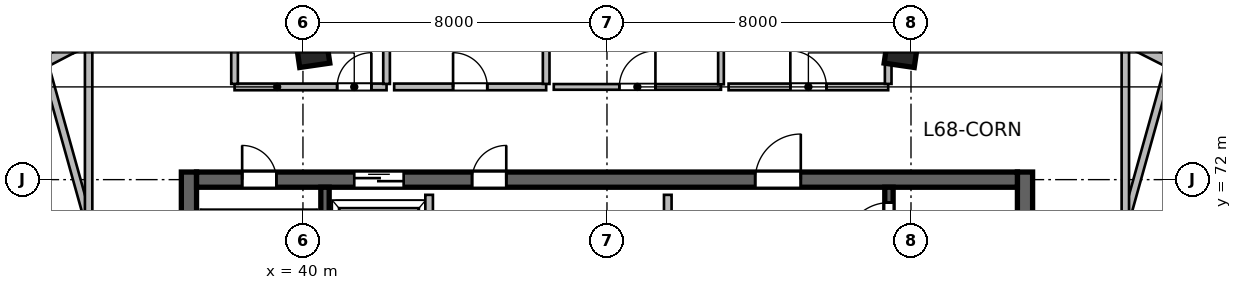
"""IFC4 building model, lengths in metres.
Left out: names, types, materials, properties, quantities, classifications, styles, units other than length and angle.
Written with IfcOpenShell. Run it as: python <this file> out.ifc"""

import sys

from ifc_helpers import new_model, si_unit, direction, frame, frame_2d, origin, origin_2d, place, context, subcontext, project, spatial, rectangle, extrude, source, transform, mapped, element, fill, save


model = new_model("IFC4")
c1 = context("Model", 3, precision=1e-05, world=origin(), true_north=direction((0.0, 1.0)))
c2 = subcontext(c1, "Body", "Model", "MODEL_VIEW")
j1 = project(units=[si_unit("LENGTHUNIT", "METRE"), si_unit("PLANEANGLEUNIT", "RADIAN")], contexts=[c1])
p1 = place(None, origin())
s1 = spatial("IfcSite", under=j1, at=p1, CompositionType="ELEMENT")
p2 = place(p1, origin())
s2 = spatial("IfcBuilding", under=s1, at=p2, CompositionType="ELEMENT")
p3 = place(p2, frame((0.0, 0.0, 279.6)))
s3 = spatial("IfcBuildingStorey", under=s2, at=p3, CompositionType="ELEMENT", Elevation=279.6)
m1 = source(origin(), c2, "Body", "SweptSolid", [
    extrude(rectangle(XDim=12.0, YDim=0.4, at=frame_2d((6.0, 0.0))), origin(), (0.0, 0.0, 1.0), 3.9),
])
for number, where, z_axis, x_axis in (
    (1, (37.0, 60.2, 0.0), (0.0, 0.0, 1.0), (0.0, 1.0, 0.0)),
    (2, (59.0, 60.2, 0.0), (0.0, 0.0, 1.0), (0.0, 1.0, 0.0)),
):
    element("IfcWall", number, at=place(p3, frame(where, z_axis=z_axis, x_axis=x_axis)), inside=s3, PredefinedType="SHEAR", context=c2, shape_type="MappedRepresentation", body=[
        mapped(m1, transform((0.0, 0.0, 0.0), scale=1.0)),
    ])
m2 = source(origin(), c2, "Body", "SweptSolid", [
    extrude(rectangle(XDim=21.6, YDim=0.4, at=frame_2d((10.8, 0.0))), origin(), (0.0, 0.0, 1.0), 3.9),
])
p4 = place(p3, frame((37.2, 72.0, 0.0), z_axis=(0.0, 0.0, 1.0), x_axis=(1.0, 0.0, 0.0)))
e3 = element("IfcWall", 3, at=p4, inside=s3, PredefinedType="SHEAR", context=c2, shape_type="MappedRepresentation", body=[
    mapped(m2, transform((0.0, 0.0, 0.0), scale=1.0)),
])
p5 = place(p4, frame((1.2, 0.0, 0.0)))
e4 = element("IfcOpeningElement", 4, at=p5, cuts=e3, PredefinedType="OPENING", context=c2, shape_type="SweptSolid", body=[
    extrude(rectangle(XDim=0.9, YDim=2.1, at=frame_2d((0.45, 1.05))), frame((0.0, 0.21, 0.0), z_axis=(0.0, -1.0, 0.0), x_axis=(1.0, 0.0, 0.0)), (0.0, 0.0, 1.0), 0.42),
])
p6 = place(p4, frame((14.7, 0.0, 0.0)))
e5 = element("IfcOpeningElement", 5, at=p6, cuts=e3, PredefinedType="OPENING", context=c2, shape_type="SweptSolid", body=[
    extrude(rectangle(XDim=1.2, YDim=2.15, at=frame_2d((0.6, 1.075))), frame((0.0, 0.21, 0.0), z_axis=(0.0, -1.0, 0.0), x_axis=(1.0, 0.0, 0.0)), (0.0, 0.0, 1.0), 0.42),
])
p7 = place(p4, frame((4.15, 0.0, 0.0)))
e6 = element("IfcOpeningElement", 6, at=p7, cuts=e3, PredefinedType="OPENING", context=c2, shape_type="SweptSolid", body=[
    extrude(rectangle(XDim=1.3, YDim=2.15, at=frame_2d((0.65, 1.075))), frame((0.0, 0.21, 0.0), z_axis=(0.0, -1.0, 0.0), x_axis=(1.0, 0.0, 0.0)), (0.0, 0.0, 1.0), 0.42),
])
p8 = place(p4, frame((7.25, 0.0, 0.0)))
e7 = element("IfcOpeningElement", 7, at=p8, cuts=e3, PredefinedType="OPENING", context=c2, shape_type="SweptSolid", body=[
    extrude(rectangle(XDim=0.9, YDim=2.1, at=frame_2d((0.45, 1.05))), frame((0.0, 0.21, 0.0), z_axis=(0.0, -1.0, 0.0), x_axis=(1.0, 0.0, 0.0)), (0.0, 0.0, 1.0), 0.42),
])
m3 = source(origin(), c2, "Body", "SweptSolid", [
    extrude(rectangle(XDim=11.2, YDim=0.22, at=frame_2d((5.6, 0.0))), origin(), (0.0, 0.0, 1.0), 3.9),
])
p9 = place(p3, frame((40.58, 60.6, 0.0), z_axis=(0.0, 0.0, 1.0), x_axis=(0.0, 1.0, 0.0)))
e8 = element("IfcWall", 8, at=p9, inside=s3, PredefinedType="SHEAR", context=c2, shape_type="MappedRepresentation", body=[
    mapped(m3, transform((0.0, 0.0, 0.0), scale=1.0)),
])
p10 = place(p3, frame((55.42, 60.6, 0.0), z_axis=(0.0, 0.0, 1.0), x_axis=(0.0, 1.0, 0.0)))
e9 = element("IfcWall", 9, at=p10, inside=s3, PredefinedType="SHEAR", context=c2, shape_type="MappedRepresentation", body=[
    mapped(m3, transform((0.0, 0.0, 0.0), scale=1.0)),
])
p11 = place(p10, frame((9.645, 0.0, 0.0)))
e10 = element("IfcOpeningElement", 10, at=p11, cuts=e9, PredefinedType="OPENING", context=c2, shape_type="SweptSolid", body=[
    extrude(rectangle(XDim=1.15, YDim=2.15, at=frame_2d((0.575, 1.075))), frame((0.0, 0.12, 0.0), z_axis=(0.0, -1.0, 0.0), x_axis=(1.0, 0.0, 0.0)), (0.0, 0.0, 1.0), 0.24),
])
m4 = source(origin(), c2, "Body", "SweptSolid", [
    extrude(rectangle(XDim=0.8, YDim=0.8, at=origin_2d()), origin(), (0.0, 0.0, 1.0), 3.9),
])
for number, where, z_axis, x_axis in (
    (11, (40.253, 75.404, 0.0), (0.0, 0.0, 1.0), (-0.143, 0.99, 0.0)),
    (12, (55.747, 75.404, 0.0), (0.0, 0.0, 1.0), (0.143, 0.99, 0.0)),
):
    element("IfcColumn", number, at=place(p3, frame(where, z_axis=z_axis, x_axis=x_axis)), inside=s3, PredefinedType="COLUMN", context=c2, shape_type="MappedRepresentation", body=[
        mapped(m4, transform((0.0, 0.0, 0.0), scale=1.0)),
    ])
m5 = source(origin(), c2, "Body", "SweptSolid", [
    extrude(rectangle(XDim=2.711, YDim=0.28, at=frame_2d((1.356, 0.0))), origin(), (0.0, 0.0, 1.0), 3.64),
])
p12 = place(p3, frame((31.502, 74.205, 0.0), z_axis=(0.0, 0.0, 1.0), x_axis=(0.886828760751, 0.462098202881, 0.0)))
e13 = element("IfcWall", 13, at=p12, inside=s3, PredefinedType="SOLIDWALL", context=c2, shape_type="MappedRepresentation", body=[
    mapped(m5, transform((0.0, 0.0, 0.0), scale=1.0)),
])
m6 = source(origin(), c2, "Body", "SweptSolid", [
    extrude(rectangle(XDim=2.673, YDim=0.28, at=frame_2d((1.337, 0.0))), origin(), (0.0, 0.0, 1.0), 3.64),
])
p13 = place(p3, frame((33.907, 75.458, 0.0), z_axis=(0.0, 0.0, 1.0), x_axis=(0.919036345912, 0.394172798266, 0.0)))
e14 = element("IfcWall", 14, at=p13, inside=s3, PredefinedType="SOLIDWALL", context=c2, shape_type="MappedRepresentation", body=[
    mapped(m6, transform((0.0, 0.0, 0.0), scale=1.0)),
])
m7 = source(origin(), c2, "Body", "SweptSolid", [
    extrude(rectangle(XDim=2.706, YDim=0.28, at=frame_2d((1.353, 0.0))), origin(), (0.0, 0.0, 1.0), 3.64),
])
p14 = place(p3, frame((61.745, 75.62, 0.0), z_axis=(0.0, 0.0, 1.0), x_axis=(0.891648836287, -0.452727680564, 0.0)))
e15 = element("IfcWall", 15, at=p14, inside=s3, PredefinedType="SOLIDWALL", context=c2, shape_type="MappedRepresentation", body=[
    mapped(m7, transform((0.0, 0.0, 0.0), scale=1.0)),
])
m8 = source(origin(), c2, "Body", "SweptSolid", [
    extrude(rectangle(XDim=5.8, YDim=0.2, at=frame_2d((2.9, 0.0))), origin(), (0.0, 0.0, 1.0), 3.64),
])
p15 = place(p3, frame((49.6, 65.8, 0.0), z_axis=(0.0, 0.0, 1.0), x_axis=(0.0, 1.0, 0.0)))
e16 = element("IfcWall", 16, at=p15, inside=s3, PredefinedType="SOLIDWALL", context=c2, shape_type="MappedRepresentation", body=[
    mapped(m8, transform((0.0, 0.0, 0.0), scale=1.0)),
])
m9 = source(origin(), c2, "Body", "SweptSolid", [
    extrude(rectangle(XDim=3.2, YDim=0.2, at=frame_2d((1.6, 0.0))), origin(), (0.0, 0.0, 1.0), 3.64),
])
p16 = place(p3, frame((43.32, 68.4, 0.0), z_axis=(0.0, 0.0, 1.0), x_axis=(0.0, 1.0, 0.0)))
e17 = element("IfcWall", 17, at=p16, inside=s3, PredefinedType="SOLIDWALL", context=c2, shape_type="MappedRepresentation", body=[
    mapped(m9, transform((0.0, 0.0, 0.0), scale=1.0)),
])
m10 = source(origin(), c2, "Body", "SweptSolid", [
    extrude(rectangle(XDim=4.0, YDim=0.175, at=frame_2d((2.0, 0.0))), origin(), (0.0, 0.0, 1.0), 3.64),
])
p17 = place(p3, frame((38.2, 74.44, 0.0), z_axis=(0.0, 0.0, 1.0), x_axis=(1.0, 0.0, 0.0)))
e18 = element("IfcWall", 18, at=p17, inside=s3, PredefinedType="PARTITIONING", context=c2, shape_type="MappedRepresentation", body=[
    mapped(m10, transform((0.0, 0.0, 0.0), scale=1.0)),
])
p18 = place(p17, frame((2.7, 0.0, 0.0)))
e19 = element("IfcOpeningElement", 19, at=p18, cuts=e18, PredefinedType="OPENING", context=c2, shape_type="SweptSolid", body=[
    extrude(rectangle(XDim=0.9, YDim=2.08, at=frame_2d((0.45, 1.04))), frame((0.0, 0.098, 0.0), z_axis=(0.0, -1.0, 0.0), x_axis=(1.0, 0.0, 0.0)), (0.0, 0.0, 1.0), 0.195),
])
m11 = source(origin(), c2, "Body", "SweptSolid", [
    extrude(rectangle(XDim=2.403, YDim=0.175, at=frame_2d((1.201, 0.0))), origin(), (0.0, 0.0, 1.0), 3.64),
])
for number, where, z_axis, x_axis in (
    (20, (38.2, 74.519, 0.0), (0.0, 0.0, 1.0), (0.0, 1.0, 0.0)),
    (21, (42.2, 74.519, 0.0), (0.0, 0.0, 1.0), (0.0, 1.0, 0.0)),
):
    element("IfcWall", number, at=place(p3, frame(where, z_axis=z_axis, x_axis=x_axis)), inside=s3, PredefinedType="PARTITIONING", context=c2, shape_type="MappedRepresentation", body=[
        mapped(m11, transform((0.0, 0.0, 0.0), scale=1.0)),
    ])
p19 = place(p3, frame((42.4, 74.44, 0.0), z_axis=(0.0, 0.0, 1.0), x_axis=(1.0, 0.0, 0.0)))
e22 = element("IfcWall", 22, at=p19, inside=s3, PredefinedType="PARTITIONING", context=c2, shape_type="MappedRepresentation", body=[
    mapped(m10, transform((0.0, 0.0, 0.0), scale=1.0)),
])
p20 = place(p19, frame((1.55, 0.0, 0.0)))
e23 = element("IfcOpeningElement", 23, at=p20, cuts=e22, PredefinedType="OPENING", context=c2, shape_type="SweptSolid", body=[
    extrude(rectangle(XDim=0.9, YDim=2.08, at=frame_2d((0.45, 1.04))), frame((0.0, 0.098, 0.0), z_axis=(0.0, -1.0, 0.0), x_axis=(1.0, 0.0, 0.0)), (0.0, 0.0, 1.0), 0.195),
])
p21 = place(p3, frame((46.4, 74.519, 0.0), z_axis=(0.0, 0.0, 1.0), x_axis=(0.0, 1.0, 0.0)))
e24 = element("IfcWall", 24, at=p21, inside=s3, PredefinedType="PARTITIONING", context=c2, shape_type="MappedRepresentation", body=[
    mapped(m11, transform((0.0, 0.0, 0.0), scale=1.0)),
])
m12 = source(origin(), c2, "Body", "SweptSolid", [
    extrude(rectangle(XDim=4.4, YDim=0.15, at=frame_2d((2.2, 0.0))), origin(), (0.0, 0.0, 1.0), 3.64),
])
p22 = place(p3, frame((46.6, 74.44, 0.0), z_axis=(0.0, 0.0, 1.0), x_axis=(1.0, 0.0, 0.0)))
e25 = element("IfcWall", 25, at=p22, inside=s3, PredefinedType="PARTITIONING", context=c2, shape_type="MappedRepresentation", body=[
    mapped(m12, transform((0.0, 0.0, 0.0), scale=1.0)),
])
p23 = place(p22, frame((1.725, 0.0, 0.0)))
e26 = element("IfcOpeningElement", 26, at=p23, cuts=e25, PredefinedType="OPENING", context=c2, shape_type="SweptSolid", body=[
    extrude(rectangle(XDim=0.95, YDim=2.1, at=frame_2d((0.475, 1.05))), frame((0.0, 0.085, 0.0), z_axis=(0.0, -1.0, 0.0), x_axis=(1.0, 0.0, 0.0)), (0.0, 0.0, 1.0), 0.17),
])
m13 = source(origin(), c2, "Body", "SweptSolid", [
    extrude(rectangle(XDim=2.425, YDim=0.15, at=frame_2d((1.212, 0.0))), origin(), (0.0, 0.0, 1.0), 3.64),
])
p24 = place(p3, frame((51.0, 74.508, 0.0), z_axis=(0.0, 0.0, 1.0), x_axis=(0.0, 1.0, 0.0)))
e27 = element("IfcWall", 27, at=p24, inside=s3, PredefinedType="PARTITIONING", context=c2, shape_type="MappedRepresentation", body=[
    mapped(m13, transform((0.0, 0.0, 0.0), scale=1.0)),
])
m14 = source(origin(), c2, "Body", "SweptSolid", [
    extrude(rectangle(XDim=4.2, YDim=0.175, at=frame_2d((2.1, 0.0))), origin(), (0.0, 0.0, 1.0), 3.64),
])
p25 = place(p3, frame((51.2, 74.44, 0.0), z_axis=(0.0, 0.0, 1.0), x_axis=(1.0, 0.0, 0.0)))
e28 = element("IfcWall", 28, at=p25, inside=s3, PredefinedType="PARTITIONING", context=c2, shape_type="MappedRepresentation", body=[
    mapped(m14, transform((0.0, 0.0, 0.0), scale=1.0)),
])
p26 = place(p25, frame((1.625, 0.0, 0.0)))
e29 = element("IfcOpeningElement", 29, at=p26, cuts=e28, PredefinedType="OPENING", context=c2, shape_type="SweptSolid", body=[
    extrude(rectangle(XDim=0.95, YDim=2.12, at=frame_2d((0.475, 1.06))), frame((0.0, 0.098, 0.0), z_axis=(0.0, -1.0, 0.0), x_axis=(1.0, 0.0, 0.0)), (0.0, 0.0, 1.0), 0.195),
])
p27 = place(p3, frame((55.4, 74.519, 0.0), z_axis=(0.0, 0.0, 1.0), x_axis=(0.0, 1.0, 0.0)))
e30 = element("IfcWall", 30, at=p27, inside=s3, PredefinedType="PARTITIONING", context=c2, shape_type="MappedRepresentation", body=[
    mapped(m11, transform((0.0, 0.0, 0.0), scale=1.0)),
])
m15 = source(origin(), c2, "Body", "SweptSolid", [
    extrude(rectangle(XDim=12.311, YDim=0.195, at=frame_2d((6.155, 0.0))), origin(), (0.0, 0.0, 1.0), 3.64),
])
p28 = place(p3, frame((36.5, 63.216, 0.0), z_axis=(0.0, 0.0, 1.0), x_axis=(-0.268759602651, 0.963207286093, 0.0)))
e31 = element("IfcWall", 31, at=p28, inside=s3, PredefinedType="PARTITIONING", context=c2, shape_type="MappedRepresentation", body=[
    mapped(m15, transform((0.0, 0.0, 0.0), scale=1.0)),
])
m16 = source(origin(), c2, "Body", "SweptSolid", [
    extrude(rectangle(XDim=17.681, YDim=0.195, at=frame_2d((8.84, 0.0))), origin(), (0.0, 0.0, 1.0), 3.64),
])
p29 = place(p3, frame((34.36, 57.96, 0.0), z_axis=(0.0, 0.0, 1.0), x_axis=(0.0, 1.0, 0.0)))
e32 = element("IfcWall", 32, at=p29, inside=s3, PredefinedType="PARTITIONING", context=c2, shape_type="MappedRepresentation", body=[
    mapped(m16, transform((0.0, 0.0, 0.0), scale=1.0)),
])
m17 = source(origin(), c2, "Body", "SweptSolid", [
    extrude(rectangle(XDim=12.307, YDim=0.195, at=frame_2d((6.153, 0.0))), origin(), (0.0, 0.0, 1.0), 3.64),
])
p30 = place(p3, frame((59.5, 63.216, 0.0), z_axis=(0.0, 0.0, 1.0), x_axis=(0.268768150257, 0.96320490105, 0.0)))
e33 = element("IfcWall", 33, at=p30, inside=s3, PredefinedType="PARTITIONING", context=c2, shape_type="MappedRepresentation", body=[
    mapped(m17, transform((0.0, 0.0, 0.0), scale=1.0)),
])
m18 = source(origin(), c2, "Body", "SweptSolid", [
    extrude(rectangle(XDim=17.664, YDim=0.195, at=frame_2d((8.832, 0.0))), origin(), (0.0, 0.0, 1.0), 3.64),
])
p31 = place(p3, frame((61.333, 55.602, 0.0), z_axis=(0.0, 0.0, 1.0), x_axis=(0.368827513738, 0.929497856431, 0.0)))
e34 = element("IfcWall", 34, at=p31, inside=s3, PredefinedType="PARTITIONING", context=c2, shape_type="MappedRepresentation", body=[
    mapped(m18, transform((0.0, 0.0, 0.0), scale=1.0)),
])
m19 = source(origin(), c2, "Body", "SweptSolid", [
    extrude(rectangle(XDim=17.693, YDim=0.195, at=frame_2d((8.847, 0.0))), origin(), (0.0, 0.0, 1.0), 3.64),
])
p32 = place(p3, frame((61.64, 57.96, 0.0), z_axis=(0.0, 0.0, 1.0), x_axis=(0.0, 1.0, 0.0)))
e35 = element("IfcWall", 35, at=p32, inside=s3, PredefinedType="PARTITIONING", context=c2, shape_type="MappedRepresentation", body=[
    mapped(m19, transform((0.0, 0.0, 0.0), scale=1.0)),
])
m20 = source(origin(), c2, "Body", "SweptSolid", [
    extrude(rectangle(XDim=0.9, YDim=2.1, at=frame_2d((0.45, 1.05))), frame((0.0, 0.025, 0.0), z_axis=(0.0, -1.0, 0.0), x_axis=(1.0, 0.0, 0.0)), (0.0, 0.0, 1.0), 0.05),
])
p33 = place(p5, origin())
e36 = element("IfcDoor", 36, at=p33, inside=s3, OperationType="SINGLE_SWING_LEFT", PredefinedType="DOOR", context=c2, shape_type="MappedRepresentation", body=[
    mapped(m20, transform((0.0, 0.0, 0.0), scale=1.0)),
])
fill(e4, e36)
m21 = source(origin(), c2, "Body", "SweptSolid", [
    extrude(rectangle(XDim=1.15, YDim=2.15, at=frame_2d((0.575, 1.075))), frame((0.0, 0.025, 0.0), z_axis=(0.0, -1.0, 0.0), x_axis=(1.0, 0.0, 0.0)), (0.0, 0.0, 1.0), 0.05),
])
p34 = place(p11, origin())
e37 = element("IfcDoor", 37, at=p34, inside=s3, OperationType="SINGLE_SWING_LEFT", PredefinedType="DOOR", context=c2, shape_type="MappedRepresentation", body=[
    mapped(m21, transform((0.0, 0.0, 0.0), scale=1.0)),
])
fill(e10, e37)
m22 = source(origin(), c2, "Body", "SweptSolid", [
    extrude(rectangle(XDim=1.2, YDim=2.15, at=frame_2d((0.6, 1.075))), frame((0.0, 0.025, 0.0), z_axis=(0.0, -1.0, 0.0), x_axis=(1.0, 0.0, 0.0)), (0.0, 0.0, 1.0), 0.05),
])
p35 = place(p6, origin())
e38 = element("IfcDoor", 38, at=p35, inside=s3, OperationType="SINGLE_SWING_RIGHT", PredefinedType="DOOR", context=c2, shape_type="MappedRepresentation", body=[
    mapped(m22, transform((0.0, 0.0, 0.0), scale=1.0)),
])
fill(e5, e38)
m23 = source(origin(), c2, "Body", "SweptSolid", [
    extrude(rectangle(XDim=1.3, YDim=2.15, at=frame_2d((0.65, 1.075))), frame((0.0, 0.025, 0.0), z_axis=(0.0, -1.0, 0.0), x_axis=(1.0, 0.0, 0.0)), (0.0, 0.0, 1.0), 0.05),
])
p36 = place(p7, origin())
e39 = element("IfcDoor", 39, at=p36, inside=s3, OperationType="DOUBLE_DOOR_SLIDING", PredefinedType="DOOR", context=c2, shape_type="MappedRepresentation", body=[
    mapped(m23, transform((0.0, 0.0, 0.0), scale=1.0)),
])
fill(e6, e39)
p37 = place(p8, origin())
e40 = element("IfcDoor", 40, at=p37, inside=s3, OperationType="SINGLE_SWING_RIGHT", PredefinedType="DOOR", context=c2, shape_type="MappedRepresentation", body=[
    mapped(m20, transform((0.0, 0.0, 0.0), scale=1.0)),
])
fill(e7, e40)
m24 = source(origin(), c2, "Body", "SweptSolid", [
    extrude(rectangle(XDim=0.9, YDim=2.08, at=frame_2d((0.45, 1.04))), frame((0.0, 0.025, 0.0), z_axis=(0.0, -1.0, 0.0), x_axis=(1.0, 0.0, 0.0)), (0.0, 0.0, 1.0), 0.05),
])
p38 = place(p18, origin())
e41 = element("IfcDoor", 41, at=p38, inside=s3, OperationType="SINGLE_SWING_RIGHT", PredefinedType="DOOR", context=c2, shape_type="MappedRepresentation", body=[
    mapped(m24, transform((0.0, 0.0, 0.0), scale=1.0)),
])
fill(e19, e41)
p39 = place(p20, origin())
e42 = element("IfcDoor", 42, at=p39, inside=s3, OperationType="SINGLE_SWING_LEFT", PredefinedType="DOOR", context=c2, shape_type="MappedRepresentation", body=[
    mapped(m24, transform((0.0, 0.0, 0.0), scale=1.0)),
])
fill(e23, e42)
m25 = source(origin(), c2, "Body", "SweptSolid", [
    extrude(rectangle(XDim=0.95, YDim=2.1, at=frame_2d((0.475, 1.05))), frame((0.0, 0.025, 0.0), z_axis=(0.0, -1.0, 0.0), x_axis=(1.0, 0.0, 0.0)), (0.0, 0.0, 1.0), 0.05),
])
p40 = place(p23, origin())
e43 = element("IfcDoor", 43, at=p40, inside=s3, OperationType="SINGLE_SWING_RIGHT", PredefinedType="DOOR", context=c2, shape_type="MappedRepresentation", body=[
    mapped(m25, transform((0.0, 0.0, 0.0), scale=1.0)),
])
fill(e26, e43)
m26 = source(origin(), c2, "Body", "SweptSolid", [
    extrude(rectangle(XDim=0.95, YDim=2.12, at=frame_2d((0.475, 1.06))), frame((0.0, 0.025, 0.0), z_axis=(0.0, -1.0, 0.0), x_axis=(1.0, 0.0, 0.0)), (0.0, 0.0, 1.0), 0.05),
])
p41 = place(p26, origin())
e44 = element("IfcDoor", 44, at=p41, inside=s3, OperationType="SINGLE_SWING_LEFT", PredefinedType="DOOR", context=c2, shape_type="MappedRepresentation", body=[
    mapped(m26, transform((0.0, 0.0, 0.0), scale=1.0)),
])
fill(e29, e44)
save(model, sys.argv[1])
